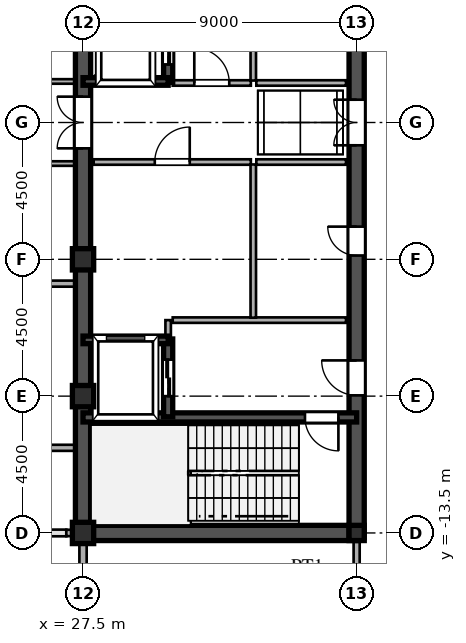
"""IFC4 building model, lengths in metres.
Left out: names, types, materials, properties, quantities, classifications, styles, units other than length and angle.
Written with IfcOpenShell. Run it as: python <this file> out.ifc"""

import sys

from ifc_helpers import new_model, si_unit, direction, frame, frame_2d, origin, origin_2d, place, context, subcontext, project, spatial, rectangle, hollow_rectangle, i_section, extrude, source, transform, mapped, element, fill, save


model = new_model("IFC4")
c1 = context("Model", 3, precision=1e-05, world=origin(), true_north=direction((0.0, 1.0)))
c2 = subcontext(c1, "Body", "Model", "MODEL_VIEW")
j1 = project(units=[si_unit("LENGTHUNIT", "METRE"), si_unit("PLANEANGLEUNIT", "RADIAN")], contexts=[c1])
p1 = place(None, origin())
s1 = spatial("IfcSite", under=j1, at=p1, CompositionType="ELEMENT")
p2 = place(p1, origin())
s2 = spatial("IfcBuilding", under=s1, at=p2, CompositionType="ELEMENT")
p3 = place(p2, frame((0.0, 0.0, 234.6)))
s3 = spatial("IfcBuildingStorey", under=s2, at=p3, CompositionType="ELEMENT", Elevation=234.6)
m1 = source(origin(), c2, "Body", "SweptSolid", [
    extrude(hollow_rectangle(XDim=0.7, YDim=0.7, WallThickness=0.03, at=origin_2d()), origin(), (0.0, 0.0, 1.0), 4.8),
])
for number, where, z_axis, x_axis in (
    (1, (27.5, -13.5, 0.0), (0.0, 0.0, 1.0), (1.0, 0.0, 0.0)),
    (2, (27.5, -9.0, 0.0), (0.0, 0.0, 1.0), (1.0, 0.0, 0.0)),
    (3, (27.5, -4.5, 0.0), (0.0, 0.0, 1.0), (1.0, 0.0, 0.0)),
):
    element("IfcColumn", number, at=place(p3, frame(where, z_axis=z_axis, x_axis=x_axis)), inside=s3, PredefinedType="COLUMN", context=c2, shape_type="MappedRepresentation", body=[
        mapped(m1, transform((0.0, 0.0, 0.0), scale=1.0)),
    ])
m2 = source(origin(), c2, "Body", "SweptSolid", [
    extrude(i_section(OverallWidth=0.5, OverallDepth=0.5, WebThickness=0.02, FlangeThickness=0.032, at=origin_2d()), origin(), (0.0, 0.0, 1.0), 4.8),
])
p4 = place(p3, frame((36.5, -13.5, 0.0), z_axis=(0.0, 0.0, 1.0), x_axis=(1.0, 0.0, 0.0)))
e4 = element("IfcColumn", 4, at=p4, inside=s3, PredefinedType="COLUMN", context=c2, shape_type="MappedRepresentation", body=[
    mapped(m2, transform((0.0, 0.0, 0.0), scale=1.0)),
])
p5 = place(p3, frame((27.5, -15.98, 0.0), z_axis=(0.0, 0.0, 1.0), x_axis=(0.0, 1.0, 0.0)))
e5 = element("IfcWall", 5, at=p5, inside=s3, PredefinedType="SOLIDWALL", context=c2, shape_type="SweptSolid", body=[
    extrude(rectangle(XDim=1.605, YDim=0.24, at=frame_2d((0.803, 0.0))), origin(), (0.0, 0.0, 1.0), 4.58),
])
p6 = place(p3, frame((27.5, -14.375, 0.0), z_axis=(0.0, 0.0, 1.0), x_axis=(0.0, 1.0, 0.0)))
e6 = element("IfcWall", 6, at=p6, inside=s3, PredefinedType="SOLIDWALL", context=c2, shape_type="SweptSolid", body=[
    extrude(rectangle(XDim=0.62, YDim=0.24, at=frame_2d((0.31, 0.0))), origin(), (0.0, 0.0, 1.0), 4.08),
])
p7 = place(p3, frame((26.95, -13.5, 0.0), z_axis=(0.0, 0.0, 1.0), x_axis=(1.0, 0.0, 0.0)))
e7 = element("IfcWall", 7, at=p7, inside=s3, PredefinedType="SOLIDWALL", context=c2, shape_type="SweptSolid", body=[
    extrude(rectangle(XDim=0.54, YDim=0.21, at=frame_2d((0.27, 0.0))), origin(), (0.0, 0.0, 1.0), 2.78),
])
for number, where, z_axis, x_axis in (
    (8, (27.5, -13.5, 0.0), (0.0, 0.0, 1.0), (0.0, 1.0, 0.0)),
    (9, (27.5, 1.3, 0.0), (0.0, 0.0, 1.0), (0.0, 1.0, 0.0)),
):
    element("IfcWall", number, at=place(p3, frame(where, z_axis=z_axis, x_axis=x_axis)), inside=s3, PredefinedType="SHEAR", context=c2, shape_type="SweptSolid", body=[
        extrude(rectangle(XDim=12.2, YDim=0.5, at=frame_2d((6.1, 0.0))), origin(), (0.0, 0.0, 1.0), 4.58),
    ])
p8 = place(p3, frame((27.5, -1.3, 0.0), z_axis=(0.0, 0.0, 1.0), x_axis=(0.0, 1.0, 0.0)))
e10 = element("IfcWall", 10, at=p8, inside=s3, PredefinedType="SHEAR", context=c2, shape_type="SweptSolid", body=[
    extrude(rectangle(XDim=2.6, YDim=0.5, at=frame_2d((1.3, 0.0))), origin(), (0.0, 0.0, 1.0), 4.58),
])
p9 = place(p8, frame((0.45, 0.0, 0.0)))
e11 = element("IfcOpeningElement", 11, at=p9, cuts=e10, PredefinedType="OPENING", context=c2, shape_type="SweptSolid", body=[
    extrude(rectangle(XDim=1.7, YDim=2.35, at=frame_2d((0.85, 1.175))), frame((0.0, 0.26, 0.0), z_axis=(0.0, -1.0, 0.0), x_axis=(1.0, 0.0, 0.0)), (0.0, 0.0, 1.0), 0.52),
])
p10 = place(p3, frame((27.5, -13.5, 0.0), z_axis=(0.0, 0.0, 1.0), x_axis=(1.0, 0.0, 0.0)))
e12 = element("IfcWall", 12, at=p10, inside=s3, PredefinedType="SHEAR", context=c2, shape_type="SweptSolid", body=[
    extrude(rectangle(XDim=9.0, YDim=0.5, at=frame_2d((4.5, 0.0))), origin(), (0.0, 0.0, 1.0), 4.58),
])
p11 = place(p3, frame((36.5, -13.65, 0.0), z_axis=(0.0, 0.0, 1.0), x_axis=(0.0, 1.0, 0.0)))
e13 = element("IfcWall", 13, at=p11, inside=s3, PredefinedType="SHEAR", context=c2, shape_type="SweptSolid", body=[
    extrude(rectangle(XDim=7.15, YDim=0.5, at=frame_2d((3.575, 0.0))), origin(), (0.0, 0.0, 1.0), 4.58),
])
p12 = place(p11, frame((4.675, 0.0, 0.0)))
e14 = element("IfcOpeningElement", 14, at=p12, cuts=e13, PredefinedType="OPENING", context=c2, shape_type="SweptSolid", body=[
    extrude(rectangle(XDim=1.15, YDim=2.2, at=frame_2d((0.575, 1.1))), frame((0.0, 0.26, 0.0), z_axis=(0.0, -1.0, 0.0), x_axis=(1.0, 0.0, 0.0)), (0.0, 0.0, 1.0), 0.52),
])
p13 = place(p3, frame((36.5, -1.3, 0.0), z_axis=(0.0, 0.0, 1.0), x_axis=(0.0, 1.0, 0.0)))
e15 = element("IfcWall", 15, at=p13, inside=s3, PredefinedType="SHEAR", context=c2, shape_type="SweptSolid", body=[
    extrude(rectangle(XDim=2.6, YDim=0.5, at=frame_2d((1.3, 0.0))), origin(), (0.0, 0.0, 1.0), 4.58),
])
p14 = place(p13, frame((0.55, 0.0, 0.0)))
e16 = element("IfcOpeningElement", 16, at=p14, cuts=e15, PredefinedType="OPENING", context=c2, shape_type="SweptSolid", body=[
    extrude(rectangle(XDim=1.5, YDim=2.3, at=frame_2d((0.75, 1.15))), frame((0.0, 0.26, 0.0), z_axis=(0.0, -1.0, 0.0), x_axis=(1.0, 0.0, 0.0)), (0.0, 0.0, 1.0), 0.52),
])
p15 = place(p3, frame((36.5, -6.5, 0.0), z_axis=(0.0, 0.0, 1.0), x_axis=(0.0, 1.0, 0.0)))
e17 = element("IfcWall", 17, at=p15, inside=s3, PredefinedType="SHEAR", context=c2, shape_type="SweptSolid", body=[
    extrude(rectangle(XDim=5.2, YDim=0.5, at=frame_2d((2.6, 0.0))), origin(), (0.0, 0.0, 1.0), 4.58),
])
p16 = place(p15, frame((2.125, 0.0, 0.0)))
e18 = element("IfcOpeningElement", 18, at=p16, cuts=e17, PredefinedType="OPENING", context=c2, shape_type="SweptSolid", body=[
    extrude(rectangle(XDim=0.95, YDim=2.15, at=frame_2d((0.475, 1.075))), frame((0.0, 0.26, 0.0), z_axis=(0.0, -1.0, 0.0), x_axis=(1.0, 0.0, 0.0)), (0.0, 0.0, 1.0), 0.52),
])
p17 = place(p3, frame((36.5, 1.3, 0.0), z_axis=(0.0, 0.0, 1.0), x_axis=(0.0, 1.0, 0.0)))
e19 = element("IfcWall", 19, at=p17, inside=s3, PredefinedType="SHEAR", context=c2, shape_type="SweptSolid", body=[
    extrude(rectangle(XDim=6.9, YDim=0.5, at=frame_2d((3.45, 0.0))), origin(), (0.0, 0.0, 1.0), 4.58),
])
p18 = place(p17, frame((2.975, 0.0, 0.0)))
e20 = element("IfcOpeningElement", 20, at=p18, cuts=e19, PredefinedType="OPENING", context=c2, shape_type="SweptSolid", body=[
    extrude(rectangle(XDim=0.95, YDim=2.15, at=frame_2d((0.475, 1.075))), frame((0.0, 0.26, 0.0), z_axis=(0.0, -1.0, 0.0), x_axis=(1.0, 0.0, 0.0)), (0.0, 0.0, 1.0), 0.52),
])
p19 = place(p3, frame((27.5, -9.7, 0.0), z_axis=(0.0, 0.0, 1.0), x_axis=(1.0, 0.0, 0.0)))
e21 = element("IfcWall", 21, at=p19, inside=s3, PredefinedType="SHEAR", context=c2, shape_type="SweptSolid", body=[
    extrude(rectangle(XDim=9.0, YDim=0.3, at=frame_2d((4.5, 0.0))), origin(), (0.0, 0.0, 1.0), 4.58),
])
p20 = place(p19, frame((7.3, 0.0, 0.0)))
e22 = element("IfcOpeningElement", 22, at=p20, cuts=e21, PredefinedType="OPENING", context=c2, shape_type="SweptSolid", body=[
    extrude(rectangle(XDim=1.1, YDim=2.2, at=frame_2d((0.55, 1.1))), frame((0.0, 0.16, 0.0), z_axis=(0.0, -1.0, 0.0), x_axis=(1.0, 0.0, 0.0)), (0.0, 0.0, 1.0), 0.32),
])
for number, where, z_axis, x_axis in (
    (23, (27.5, -7.15, 0.0), (0.0, 0.0, 1.0), (1.0, 0.0, 0.0)),
    (24, (27.5, 1.35, 0.0), (0.0, 0.0, 1.0), (1.0, 0.0, 0.0)),
):
    element("IfcWall", number, at=place(p3, frame(where, z_axis=z_axis, x_axis=x_axis)), inside=s3, PredefinedType="SHEAR", context=c2, shape_type="SweptSolid", body=[
        extrude(rectangle(XDim=2.8, YDim=0.25, at=frame_2d((1.4, 0.0))), origin(), (0.0, 0.0, 1.0), 4.58),
    ])
p21 = place(p3, frame((30.3, -9.68, 0.0), z_axis=(0.0, 0.0, 1.0), x_axis=(0.0, 1.0, 0.0)))
e25 = element("IfcWall", 25, at=p21, inside=s3, PredefinedType="SHEAR", context=c2, shape_type="SweptSolid", body=[
    extrude(rectangle(XDim=2.56, YDim=0.3, at=frame_2d((1.28, 0.0))), origin(), (0.0, 0.0, 1.0), 4.58),
])
p22 = place(p21, frame((0.68, 0.0, 0.0)))
e26 = element("IfcOpeningElement", 26, at=p22, cuts=e25, PredefinedType="OPENING", context=c2, shape_type="SweptSolid", body=[
    extrude(rectangle(XDim=1.2, YDim=2.25, at=frame_2d((0.6, 1.125))), frame((0.0, 0.16, 0.0), z_axis=(0.0, -1.0, 0.0), x_axis=(1.0, 0.0, 0.0)), (0.0, 0.0, 1.0), 0.32),
])
p23 = place(p3, frame((30.3, 1.32, 0.0), z_axis=(0.0, 0.0, 1.0), x_axis=(0.0, 1.0, 0.0)))
e27 = element("IfcWall", 27, at=p23, inside=s3, PredefinedType="SHEAR", context=c2, shape_type="SweptSolid", body=[
    extrude(rectangle(XDim=2.28, YDim=0.3, at=frame_2d((1.14, 0.0))), origin(), (0.0, 0.0, 1.0), 4.58),
])
p24 = place(p23, frame((0.59, 0.0, 0.0)))
e28 = element("IfcOpeningElement", 28, at=p24, cuts=e27, PredefinedType="OPENING", context=c2, shape_type="SweptSolid", body=[
    extrude(rectangle(XDim=1.1, YDim=2.2, at=frame_2d((0.55, 1.1))), frame((0.0, 0.16, 0.0), z_axis=(0.0, -1.0, 0.0), x_axis=(1.0, 0.0, 0.0)), (0.0, 0.0, 1.0), 0.32),
])
p25 = place(p3, frame((30.45, -6.5, 0.0), z_axis=(0.0, 0.0, 1.0), x_axis=(1.0, 0.0, 0.0)))
e29 = element("IfcWall", 29, at=p25, inside=s3, PredefinedType="PARTITIONING", context=c2, shape_type="SweptSolid", body=[
    extrude(rectangle(XDim=5.7, YDim=0.18, at=frame_2d((2.85, 0.0))), origin(), (0.0, 0.0, 1.0), 4.58),
])
p26 = place(p3, frame((30.3, -7.12, 0.0), z_axis=(0.0, 0.0, 1.0), x_axis=(0.0, 1.0, 0.0)))
e30 = element("IfcWall", 30, at=p26, inside=s3, PredefinedType="PARTITIONING", context=c2, shape_type="SweptSolid", body=[
    extrude(rectangle(XDim=0.62, YDim=0.18, at=frame_2d((0.31, 0.0))), origin(), (0.0, 0.0, 1.0), 4.58),
])
p27 = place(p3, frame((33.1, -6.42, 0.0), z_axis=(0.0, 0.0, 1.0), x_axis=(0.0, 1.0, 0.0)))
e31 = element("IfcWall", 31, at=p27, inside=s3, PredefinedType="PARTITIONING", context=c2, shape_type="SweptSolid", body=[
    extrude(rectangle(XDim=5.04, YDim=0.18, at=frame_2d((2.52, 0.0))), origin(), (0.0, 0.0, 1.0), 4.58),
])
p28 = place(p3, frame((33.1, 1.38, 0.0), z_axis=(0.0, 0.0, 1.0), x_axis=(0.0, 1.0, 0.0)))
e32 = element("IfcWall", 32, at=p28, inside=s3, PredefinedType="PARTITIONING", context=c2, shape_type="SweptSolid", body=[
    extrude(rectangle(XDim=6.74, YDim=0.18, at=frame_2d((3.37, 0.0))), origin(), (0.0, 0.0, 1.0), 4.58),
])
p29 = place(p3, frame((27.85, -1.3, 0.0), z_axis=(0.0, 0.0, 1.0), x_axis=(1.0, 0.0, 0.0)))
e33 = element("IfcWall", 33, at=p29, inside=s3, PredefinedType="PARTITIONING", context=c2, shape_type="SweptSolid", body=[
    extrude(rectangle(XDim=5.17, YDim=0.18, at=frame_2d((2.585, 0.0))), origin(), (0.0, 0.0, 1.0), 4.58),
])
p30 = place(p29, frame((2.01, 0.0, 0.0)))
e34 = element("IfcOpeningElement", 34, at=p30, cuts=e33, PredefinedType="OPENING", context=c2, shape_type="SweptSolid", body=[
    extrude(rectangle(XDim=1.15, YDim=2.2, at=frame_2d((0.575, 1.1))), frame((0.0, 0.1, 0.0), z_axis=(0.0, -1.0, 0.0), x_axis=(1.0, 0.0, 0.0)), (0.0, 0.0, 1.0), 0.2),
])
p31 = place(p3, frame((30.45, 1.3, 0.0), z_axis=(0.0, 0.0, 1.0), x_axis=(1.0, 0.0, 0.0)))
e35 = element("IfcWall", 35, at=p31, inside=s3, PredefinedType="PARTITIONING", context=c2, shape_type="SweptSolid", body=[
    extrude(rectangle(XDim=2.57, YDim=0.18, at=frame_2d((1.285, 0.0))), origin(), (0.0, 0.0, 1.0), 4.58),
])
p32 = place(p31, frame((0.71, 0.0, 0.0)))
e36 = element("IfcOpeningElement", 36, at=p32, cuts=e35, PredefinedType="OPENING", context=c2, shape_type="SweptSolid", body=[
    extrude(rectangle(XDim=1.15, YDim=2.2, at=frame_2d((0.575, 1.1))), frame((0.0, 0.1, 0.0), z_axis=(0.0, -1.0, 0.0), x_axis=(1.0, 0.0, 0.0)), (0.0, 0.0, 1.0), 0.2),
])
for number, where, z_axis, x_axis in (
    (37, (33.2, -1.3, 0.0), (0.0, 0.0, 1.0), (1.0, 0.0, 0.0)),
    (38, (33.2, 1.3, 0.0), (0.0, 0.0, 1.0), (1.0, 0.0, 0.0)),
):
    element("IfcWall", number, at=place(p3, frame(where, z_axis=z_axis, x_axis=x_axis)), inside=s3, PredefinedType="PARTITIONING", context=c2, shape_type="SweptSolid", body=[
        extrude(rectangle(XDim=2.95, YDim=0.18, at=frame_2d((1.475, 0.0))), origin(), (0.0, 0.0, 1.0), 4.58),
    ])
p33 = place(p3, frame((-27.245, -10.7, 0.0), z_axis=(0.0, 0.0, 1.0), x_axis=(1.0, 0.0, 0.0)))
e39 = element("IfcWall", 39, at=p33, inside=s3, PredefinedType="PARTITIONING", context=c2, shape_type="SweptSolid", body=[
    extrude(rectangle(XDim=54.49, YDim=0.2, at=frame_2d((27.245, 0.0))), origin(), (0.0, 0.0, 1.0), 4.58),
])
p34 = place(p33, frame((25.77, 0.0, 0.0)))
e40 = element("IfcOpeningElement", 40, at=p34, cuts=e39, PredefinedType="OPENING", context=c2, shape_type="SweptSolid", body=[
    extrude(rectangle(XDim=1.15, YDim=2.2, at=frame_2d((0.575, 1.1))), frame((0.0, 0.11, 0.0), z_axis=(0.0, -1.0, 0.0), x_axis=(1.0, 0.0, 0.0)), (0.0, 0.0, 1.0), 0.22),
])
p35 = place(p3, frame((-27.245, -5.3, 0.0), z_axis=(0.0, 0.0, 1.0), x_axis=(1.0, 0.0, 0.0)))
e41 = element("IfcWall", 41, at=p35, inside=s3, PredefinedType="PARTITIONING", context=c2, shape_type="SweptSolid", body=[
    extrude(rectangle(XDim=54.49, YDim=0.2, at=frame_2d((27.245, 0.0))), origin(), (0.0, 0.0, 1.0), 4.58),
])
p36 = place(p35, frame((25.77, 0.0, 0.0)))
e42 = element("IfcOpeningElement", 42, at=p36, cuts=e41, PredefinedType="OPENING", context=c2, shape_type="SweptSolid", body=[
    extrude(rectangle(XDim=1.15, YDim=2.2, at=frame_2d((0.575, 1.1))), frame((0.0, 0.11, 0.0), z_axis=(0.0, -1.0, 0.0), x_axis=(1.0, 0.0, 0.0)), (0.0, 0.0, 1.0), 0.22),
])
p37 = place(p35, frame((17.67, 0.0, 0.0)))
e43 = element("IfcOpeningElement", 43, at=p37, cuts=e41, PredefinedType="OPENING", context=c2, shape_type="SweptSolid", body=[
    extrude(rectangle(XDim=1.15, YDim=2.2, at=frame_2d((0.575, 1.1))), frame((0.0, 0.11, 0.0), z_axis=(0.0, -1.0, 0.0), x_axis=(1.0, 0.0, 0.0)), (0.0, 0.0, 1.0), 0.22),
])
p38 = place(p35, frame((35.17, 0.0, 0.0)))
e44 = element("IfcOpeningElement", 44, at=p38, cuts=e41, PredefinedType="OPENING", context=c2, shape_type="SweptSolid", body=[
    extrude(rectangle(XDim=1.15, YDim=2.2, at=frame_2d((0.575, 1.1))), frame((0.0, 0.11, 0.0), z_axis=(0.0, -1.0, 0.0), x_axis=(1.0, 0.0, 0.0)), (0.0, 0.0, 1.0), 0.22),
])
p39 = place(p3, frame((7.785, -1.35, 0.0), z_axis=(0.0, 0.0, 1.0), x_axis=(1.0, 0.0, 0.0)))
e45 = element("IfcWall", 45, at=p39, inside=s3, PredefinedType="PARTITIONING", context=c2, shape_type="SweptSolid", body=[
    extrude(rectangle(XDim=19.46, YDim=0.15, at=frame_2d((9.73, 0.0))), origin(), (0.0, 0.0, 1.0), 4.58),
])
p40 = place(p39, frame((5.49, 0.0, 0.0)))
e46 = element("IfcOpeningElement", 46, at=p40, cuts=e45, PredefinedType="OPENING", context=c2, shape_type="SweptSolid", body=[
    extrude(rectangle(XDim=0.95, YDim=2.15, at=frame_2d((0.475, 1.075))), frame((0.0, 0.085, 0.0), z_axis=(0.0, -1.0, 0.0), x_axis=(1.0, 0.0, 0.0)), (0.0, 0.0, 1.0), 0.17),
])
p41 = place(p3, frame((7.785, 1.35, 0.0), z_axis=(0.0, 0.0, 1.0), x_axis=(1.0, 0.0, 0.0)))
e47 = element("IfcWall", 47, at=p41, inside=s3, PredefinedType="PARTITIONING", context=c2, shape_type="SweptSolid", body=[
    extrude(rectangle(XDim=19.46, YDim=0.15, at=frame_2d((9.73, 0.0))), origin(), (0.0, 0.0, 1.0), 4.58),
])
p42 = place(p41, frame((5.49, 0.0, 0.0)))
e48 = element("IfcOpeningElement", 48, at=p42, cuts=e47, PredefinedType="OPENING", context=c2, shape_type="SweptSolid", body=[
    extrude(rectangle(XDim=0.95, YDim=2.15, at=frame_2d((0.475, 1.075))), frame((0.0, 0.085, 0.0), z_axis=(0.0, -1.0, 0.0), x_axis=(1.0, 0.0, 0.0)), (0.0, 0.0, 1.0), 0.17),
])
p43 = place(p3, frame((36.5, -15.515, 0.0), z_axis=(0.0, 0.0, 1.0), x_axis=(0.0, 1.0, 0.0)))
e49 = element("IfcWall", 49, at=p43, inside=s3, PredefinedType="PARTITIONING", context=c2, shape_type="SweptSolid", body=[
    extrude(rectangle(XDim=1.76, YDim=0.2, at=frame_2d((0.88, 0.0))), origin(), (0.0, 0.0, 1.0), 3.98),
])
m3 = source(origin(), c2, "Body", "SweptSolid", [
    extrude(rectangle(XDim=1.7, YDim=2.35, at=frame_2d((0.85, 1.175))), frame((0.0, 0.025, 0.0), z_axis=(0.0, -1.0, 0.0), x_axis=(1.0, 0.0, 0.0)), (0.0, 0.0, 1.0), 0.05),
])
p44 = place(p9, origin())
e50 = element("IfcDoor", 50, at=p44, inside=s3, OperationType="DOUBLE_SWING_LEFT", PredefinedType="DOOR", context=c2, shape_type="MappedRepresentation", body=[
    mapped(m3, transform((0.0, 0.0, 0.0), scale=1.0)),
])
fill(e11, e50)
m4 = source(origin(), c2, "Body", "SweptSolid", [
    extrude(rectangle(XDim=1.15, YDim=2.2, at=frame_2d((0.575, 1.1))), frame((0.0, 0.025, 0.0), z_axis=(0.0, -1.0, 0.0), x_axis=(1.0, 0.0, 0.0)), (0.0, 0.0, 1.0), 0.05),
])
p45 = place(p12, origin())
e51 = element("IfcDoor", 51, at=p45, inside=s3, OperationType="SINGLE_SWING_RIGHT", PredefinedType="DOOR", context=c2, shape_type="MappedRepresentation", body=[
    mapped(m4, transform((0.0, 0.0, 0.0), scale=1.0)),
])
fill(e14, e51)
m5 = source(origin(), c2, "Body", "SweptSolid", [
    extrude(rectangle(XDim=1.5, YDim=2.3, at=frame_2d((0.75, 1.15))), frame((0.0, 0.025, 0.0), z_axis=(0.0, -1.0, 0.0), x_axis=(1.0, 0.0, 0.0)), (0.0, 0.0, 1.0), 0.05),
])
p46 = place(p14, origin())
e52 = element("IfcDoor", 52, at=p46, inside=s3, OperationType="DOUBLE_SWING_LEFT", PredefinedType="DOOR", context=c2, shape_type="MappedRepresentation", body=[
    mapped(m5, transform((0.0, 0.0, 0.0), scale=1.0)),
])
fill(e16, e52)
m6 = source(origin(), c2, "Body", "SweptSolid", [
    extrude(rectangle(XDim=0.95, YDim=2.15, at=frame_2d((0.475, 1.075))), frame((0.0, 0.025, 0.0), z_axis=(0.0, -1.0, 0.0), x_axis=(1.0, 0.0, 0.0)), (0.0, 0.0, 1.0), 0.05),
])
p47 = place(p16, origin())
e53 = element("IfcDoor", 53, at=p47, inside=s3, OperationType="SINGLE_SWING_RIGHT", PredefinedType="DOOR", context=c2, shape_type="MappedRepresentation", body=[
    mapped(m6, transform((0.0, 0.0, 0.0), scale=1.0)),
])
fill(e18, e53)
m7 = source(origin(), c2, "Body", "SweptSolid", [
    extrude(rectangle(XDim=1.1, YDim=2.2, at=frame_2d((0.55, 1.1))), frame((0.0, 0.025, 0.0), z_axis=(0.0, -1.0, 0.0), x_axis=(1.0, 0.0, 0.0)), (0.0, 0.0, 1.0), 0.05),
])
p48 = place(p20, frame((1.1, 0.0, 0.0), z_axis=(0.0, 0.0, 1.0), x_axis=(-1.0, 0.0, 0.0)))
e54 = element("IfcDoor", 54, at=p48, inside=s3, OperationType="SINGLE_SWING_RIGHT", PredefinedType="DOOR", context=c2, shape_type="MappedRepresentation", body=[
    mapped(m7, transform((0.0, 0.0, 0.0), scale=1.0)),
])
fill(e22, e54)
m8 = source(origin(), c2, "Body", "SweptSolid", [
    extrude(rectangle(XDim=1.2, YDim=2.25, at=frame_2d((0.6, 1.125))), frame((0.0, 0.025, 0.0), z_axis=(0.0, -1.0, 0.0), x_axis=(1.0, 0.0, 0.0)), (0.0, 0.0, 1.0), 0.05),
])
p49 = place(p22, origin())
e55 = element("IfcDoor", 55, at=p49, inside=s3, OperationType="DOUBLE_DOOR_SLIDING", PredefinedType="DOOR", context=c2, shape_type="MappedRepresentation", body=[
    mapped(m8, transform((0.0, 0.0, 0.0), scale=1.0)),
])
fill(e26, e55)
m9 = source(origin(), c2, "Body", "SweptSolid", [
    extrude(rectangle(XDim=1.1, YDim=2.2, at=frame_2d((0.55, 1.1))), frame((0.0, 0.025, 0.0), z_axis=(0.0, -1.0, 0.0), x_axis=(1.0, 0.0, 0.0)), (0.0, 0.0, 1.0), 0.05),
])
p50 = place(p24, origin())
e56 = element("IfcDoor", 56, at=p50, inside=s3, OperationType="DOUBLE_DOOR_SLIDING", PredefinedType="DOOR", context=c2, shape_type="MappedRepresentation", body=[
    mapped(m9, transform((0.0, 0.0, 0.0), scale=1.0)),
])
fill(e28, e56)
p51 = place(p30, origin())
e57 = element("IfcDoor", 57, at=p51, inside=s3, OperationType="SINGLE_SWING_RIGHT", PredefinedType="DOOR", context=c2, shape_type="MappedRepresentation", body=[
    mapped(m4, transform((0.0, 0.0, 0.0), scale=1.0)),
])
fill(e34, e57)
p52 = place(p32, origin())
e58 = element("IfcDoor", 58, at=p52, inside=s3, OperationType="SINGLE_SWING_LEFT", PredefinedType="DOOR", context=c2, shape_type="MappedRepresentation", body=[
    mapped(m4, transform((0.0, 0.0, 0.0), scale=1.0)),
])
fill(e36, e58)
save(model, sys.argv[1])
